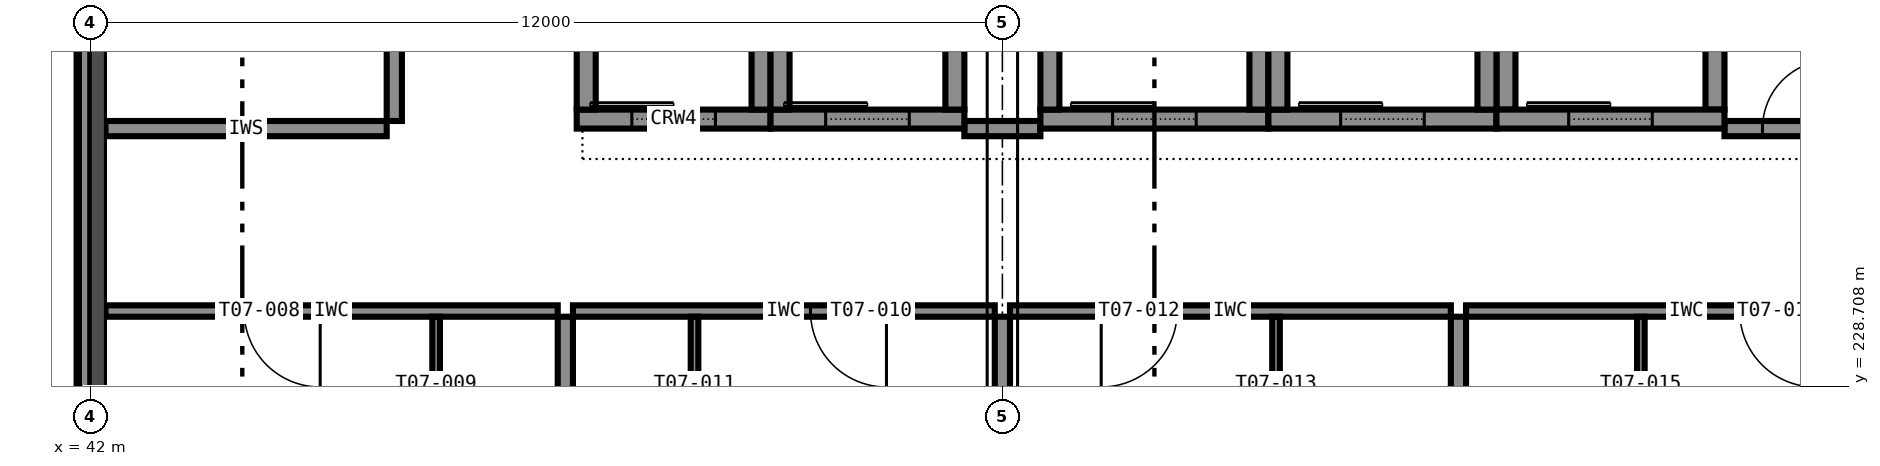
"""IFC4 building model, lengths in metres.
Left out: names, types, materials, properties, quantities, classifications, styles, units other than length and angle.
Written with IfcOpenShell. Run it as: python <this file> out.ifc"""

import sys

from ifc_helpers import new_model, si_unit, direction, frame, frame_2d, origin, place, context, subcontext, project, spatial, rectangle, extrude, element, fill, save


model = new_model("IFC4")
c1 = context("Model", 3, precision=1e-05, world=origin(), true_north=direction((0.0, 1.0)))
c2 = subcontext(c1, "Body", "Model", "MODEL_VIEW")
j1 = project(units=[si_unit("LENGTHUNIT", "METRE"), si_unit("PLANEANGLEUNIT", "RADIAN")], contexts=[c1])
p1 = place(None, origin())
s1 = spatial("IfcSite", under=j1, at=p1, CompositionType="ELEMENT")
p2 = place(p1, origin())
s2 = spatial("IfcBuilding", under=s1, at=p2, CompositionType="ELEMENT")
p3 = place(p2, frame((0.0, 0.0, 39.0)))
s3 = spatial("IfcBuildingStorey", under=s2, at=p3, CompositionType="ELEMENT", Elevation=39.0)
p4 = place(p3, frame((54.5, 232.225, 0.0), z_axis=(0.0, 0.0, 1.0), x_axis=(1.0, 0.0, 0.0)))
e1 = element("IfcWall", 1, at=p4, inside=s3, PredefinedType="SHEAR", context=c2, shape_type="SweptSolid", body=[
    extrude(rectangle(XDim=3.0, YDim=0.25, at=frame_2d((1.5, 0.0))), origin(), (0.0, 0.0, 1.0), 3.6),
])
p5 = place(p4, frame((0.95, 0.0, 0.0)))
e2 = element("IfcOpeningElement", 2, at=p5, cuts=e1, PredefinedType="OPENING", context=c2, shape_type="SweptSolid", body=[
    extrude(rectangle(XDim=1.1, YDim=2.1, at=frame_2d((0.55, 1.05))), frame((0.0, 0.135, 0.0), z_axis=(0.0, -1.0, 0.0), x_axis=(1.0, 0.0, 0.0)), (0.0, 0.0, 1.0), 0.27),
])
for number, where, z_axis, x_axis in (
    (3, (54.625, 232.35, 0.0), (0.0, 0.0, 1.0), (0.0, 1.0, 0.0)),
    (4, (57.375, 232.35, 0.0), (0.0, 0.0, 1.0), (0.0, 1.0, 0.0)),
):
    element("IfcWall", number, at=place(p3, frame(where, z_axis=z_axis, x_axis=x_axis)), inside=s3, PredefinedType="SHEAR", context=c2, shape_type="SweptSolid", body=[
        extrude(rectangle(XDim=3.3, YDim=0.25, at=frame_2d((1.65, 0.0))), origin(), (0.0, 0.0, 1.0), 3.6),
    ])
p6 = place(p3, frame((57.5, 232.225, 0.0), z_axis=(0.0, 0.0, 1.0), x_axis=(1.0, 0.0, 0.0)))
e5 = element("IfcWall", 5, at=p6, inside=s3, PredefinedType="SHEAR", context=c2, shape_type="SweptSolid", body=[
    extrude(rectangle(XDim=3.0, YDim=0.25, at=frame_2d((1.5, 0.0))), origin(), (0.0, 0.0, 1.0), 3.6),
])
p7 = place(p6, frame((0.95, 0.0, 0.0)))
e6 = element("IfcOpeningElement", 6, at=p7, cuts=e5, PredefinedType="OPENING", context=c2, shape_type="SweptSolid", body=[
    extrude(rectangle(XDim=1.1, YDim=2.1, at=frame_2d((0.55, 1.05))), frame((0.0, 0.135, 0.0), z_axis=(0.0, -1.0, 0.0), x_axis=(1.0, 0.0, 0.0)), (0.0, 0.0, 1.0), 0.27),
])
for number, where, z_axis, x_axis in (
    (7, (57.625, 232.35, 0.0), (0.0, 0.0, 1.0), (0.0, 1.0, 0.0)),
    (8, (60.375, 232.35, 0.0), (0.0, 0.0, 1.0), (0.0, 1.0, 0.0)),
):
    element("IfcWall", number, at=place(p3, frame(where, z_axis=z_axis, x_axis=x_axis)), inside=s3, PredefinedType="SHEAR", context=c2, shape_type="SweptSolid", body=[
        extrude(rectangle(XDim=3.3, YDim=0.25, at=frame_2d((1.65, 0.0))), origin(), (0.0, 0.0, 1.0), 3.6),
    ])
p8 = place(p3, frame((60.5, 232.225, 0.0), z_axis=(0.0, 0.0, 1.0), x_axis=(1.0, 0.0, 0.0)))
e9 = element("IfcWall", 9, at=p8, inside=s3, PredefinedType="SHEAR", context=c2, shape_type="SweptSolid", body=[
    extrude(rectangle(XDim=3.0, YDim=0.25, at=frame_2d((1.5, 0.0))), origin(), (0.0, 0.0, 1.0), 3.6),
])
p9 = place(p8, frame((0.95, 0.0, 0.0)))
e10 = element("IfcOpeningElement", 10, at=p9, cuts=e9, PredefinedType="OPENING", context=c2, shape_type="SweptSolid", body=[
    extrude(rectangle(XDim=1.1, YDim=2.1, at=frame_2d((0.55, 1.05))), frame((0.0, 0.135, 0.0), z_axis=(0.0, -1.0, 0.0), x_axis=(1.0, 0.0, 0.0)), (0.0, 0.0, 1.0), 0.27),
])
for number, where, z_axis, x_axis in (
    (11, (60.625, 232.35, 0.0), (0.0, 0.0, 1.0), (0.0, 1.0, 0.0)),
    (12, (63.375, 232.35, 0.0), (0.0, 0.0, 1.0), (0.0, 1.0, 0.0)),
):
    element("IfcWall", number, at=place(p3, frame(where, z_axis=z_axis, x_axis=x_axis)), inside=s3, PredefinedType="SHEAR", context=c2, shape_type="SweptSolid", body=[
        extrude(rectangle(XDim=3.3, YDim=0.25, at=frame_2d((1.65, 0.0))), origin(), (0.0, 0.0, 1.0), 3.6),
    ])
p10 = place(p3, frame((48.4, 232.225, 0.0), z_axis=(0.0, 0.0, 1.0), x_axis=(1.0, 0.0, 0.0)))
e13 = element("IfcWall", 13, at=p10, inside=s3, PredefinedType="SHEAR", context=c2, shape_type="SweptSolid", body=[
    extrude(rectangle(XDim=2.55, YDim=0.25, at=frame_2d((1.275, 0.0))), origin(), (0.0, 0.0, 1.0), 3.6),
])
p11 = place(p10, frame((0.725, 0.0, 0.0)))
e14 = element("IfcOpeningElement", 14, at=p11, cuts=e13, PredefinedType="OPENING", context=c2, shape_type="SweptSolid", body=[
    extrude(rectangle(XDim=1.1, YDim=2.1, at=frame_2d((0.55, 1.05))), frame((0.0, 0.135, 0.0), z_axis=(0.0, -1.0, 0.0), x_axis=(1.0, 0.0, 0.0)), (0.0, 0.0, 1.0), 0.27),
])
for number, where, z_axis, x_axis in (
    (15, (48.525, 232.35, 0.0), (0.0, 0.0, 1.0), (0.0, 1.0, 0.0)),
    (16, (50.825, 232.35, 0.0), (0.0, 0.0, 1.0), (0.0, 1.0, 0.0)),
):
    element("IfcWall", number, at=place(p3, frame(where, z_axis=z_axis, x_axis=x_axis)), inside=s3, PredefinedType="SHEAR", context=c2, shape_type="SweptSolid", body=[
        extrude(rectangle(XDim=3.3, YDim=0.25, at=frame_2d((1.65, 0.0))), origin(), (0.0, 0.0, 1.0), 3.6),
    ])
p12 = place(p3, frame((50.95, 232.225, 0.0), z_axis=(0.0, 0.0, 1.0), x_axis=(1.0, 0.0, 0.0)))
e17 = element("IfcWall", 17, at=p12, inside=s3, PredefinedType="SHEAR", context=c2, shape_type="SweptSolid", body=[
    extrude(rectangle(XDim=2.55, YDim=0.25, at=frame_2d((1.275, 0.0))), origin(), (0.0, 0.0, 1.0), 3.6),
])
p13 = place(p12, frame((0.725, 0.0, 0.0)))
e18 = element("IfcOpeningElement", 18, at=p13, cuts=e17, PredefinedType="OPENING", context=c2, shape_type="SweptSolid", body=[
    extrude(rectangle(XDim=1.1, YDim=2.1, at=frame_2d((0.55, 1.05))), frame((0.0, 0.135, 0.0), z_axis=(0.0, -1.0, 0.0), x_axis=(1.0, 0.0, 0.0)), (0.0, 0.0, 1.0), 0.27),
])
for number, where, z_axis, x_axis in (
    (19, (51.075, 232.35, 0.0), (0.0, 0.0, 1.0), (0.0, 1.0, 0.0)),
    (20, (53.375, 232.35, 0.0), (0.0, 0.0, 1.0), (0.0, 1.0, 0.0)),
):
    element("IfcWall", number, at=place(p3, frame(where, z_axis=z_axis, x_axis=x_axis)), inside=s3, PredefinedType="SHEAR", context=c2, shape_type="SweptSolid", body=[
        extrude(rectangle(XDim=3.3, YDim=0.25, at=frame_2d((1.65, 0.0))), origin(), (0.0, 0.0, 1.0), 3.6),
    ])
p14 = place(p3, frame((41.925, 233.6, 3.4), z_axis=(0.0, 0.0, 1.0), x_axis=(0.0, -1.0, 0.0)))
e21 = element("IfcWall", 21, at=p14, inside=s3, PredefinedType="STANDARD", context=c2, shape_type="SweptSolid", body=[
    extrude(rectangle(XDim=11.2, YDim=0.15, at=frame_2d((5.6, 0.0))), origin(), (0.0, 0.0, 1.0), 0.2),
])
p15 = place(p3, frame((42.2, 232.1, 0.0), z_axis=(0.0, 0.0, 1.0), x_axis=(1.0, 0.0, 0.0)))
e22 = element("IfcWall", 22, at=p15, inside=s3, PredefinedType="PARTITIONING", context=c2, shape_type="SweptSolid", body=[
    extrude(rectangle(XDim=3.7, YDim=0.2, at=frame_2d((1.85, 0.0))), origin(), (0.0, 0.0, 1.0), 3.4),
])
p16 = place(p3, frame((53.5, 232.1, 0.0), z_axis=(0.0, 0.0, 1.0), x_axis=(1.0, 0.0, 0.0)))
e23 = element("IfcWall", 23, at=p16, inside=s3, PredefinedType="PARTITIONING", context=c2, shape_type="SweptSolid", body=[
    extrude(rectangle(XDim=1.0, YDim=0.2, at=frame_2d((0.5, 0.0))), origin(), (0.0, 0.0, 1.0), 3.4),
])
p17 = place(p3, frame((63.5, 232.1, 0.0), z_axis=(0.0, 0.0, 1.0), x_axis=(1.0, 0.0, 0.0)))
e24 = element("IfcWall", 24, at=p17, inside=s3, PredefinedType="PARTITIONING", context=c2, shape_type="SweptSolid", body=[
    extrude(rectangle(XDim=1.9, YDim=0.2, at=frame_2d((0.95, 0.0))), origin(), (0.0, 0.0, 1.0), 3.4),
])
p18 = place(p17, frame((0.5, 0.0, 0.0)))
e25 = element("IfcOpeningElement", 25, at=p18, cuts=e24, PredefinedType="OPENING", context=c2, shape_type="SweptSolid", body=[
    extrude(rectangle(XDim=0.9, YDim=2.1, at=frame_2d((0.45, 1.05))), frame((0.0, 0.11, 0.0), z_axis=(0.0, -1.0, 0.0), x_axis=(1.0, 0.0, 0.0)), (0.0, 0.0, 1.0), 0.22),
])
p19 = place(p3, frame((46.0, 232.2, 0.0), z_axis=(0.0, 0.0, 1.0), x_axis=(0.0, 1.0, 0.0)))
e26 = element("IfcWall", 26, at=p19, inside=s3, PredefinedType="PARTITIONING", context=c2, shape_type="SweptSolid", body=[
    extrude(rectangle(XDim=3.6, YDim=0.2, at=frame_2d((1.8, 0.0))), origin(), (0.0, 0.0, 1.0), 3.4),
])
p20 = place(p19, frame((1.35, 0.0, 0.0)))
e27 = element("IfcOpeningElement", 27, at=p20, cuts=e26, PredefinedType="OPENING", context=c2, shape_type="SweptSolid", body=[
    extrude(rectangle(XDim=0.9, YDim=2.1, at=frame_2d((0.45, 1.05))), frame((0.0, 0.11, 0.0), z_axis=(0.0, -1.0, 0.0), x_axis=(1.0, 0.0, 0.0)), (0.0, 0.0, 1.0), 0.22),
])
p21 = place(p3, frame((48.15, 229.7, 0.0), z_axis=(0.0, 0.0, 1.0), x_axis=(-1.0, 0.0, 0.0)))
e28 = element("IfcWall", 28, at=p21, inside=s3, PredefinedType="PARTITIONING", context=c2, shape_type="SweptSolid", body=[
    extrude(rectangle(XDim=5.95, YDim=0.15, at=frame_2d((2.975, 0.0))), origin(), (0.0, 0.0, 1.0), 3.4),
])
p22 = place(p21, frame((3.125, 0.0, 0.0)))
e29 = element("IfcOpeningElement", 29, at=p22, cuts=e28, PredefinedType="OPENING", context=c2, shape_type="SweptSolid", body=[
    extrude(rectangle(XDim=1.0, YDim=2.1, at=frame_2d((0.5, 1.05))), frame((0.0, 0.085, 0.0), z_axis=(0.0, -1.0, 0.0), x_axis=(1.0, 0.0, 0.0)), (0.0, 0.0, 1.0), 0.17),
])
p23 = place(p3, frame((46.55, 226.75, 0.0), z_axis=(0.0, 0.0, 1.0), x_axis=(0.0, 1.0, 0.0)))
e30 = element("IfcWall", 30, at=p23, inside=s3, PredefinedType="PARTITIONING", context=c2, shape_type="SweptSolid", body=[
    extrude(rectangle(XDim=2.875, YDim=0.1, at=frame_2d((1.438, 0.0))), origin(), (0.0, 0.0, 1.0), 3.4),
])
p24 = place(p23, frame((1.038, 0.0, 0.0)))
e31 = element("IfcOpeningElement", 31, at=p24, cuts=e30, PredefinedType="OPENING", context=c2, shape_type="SweptSolid", body=[
    extrude(rectangle(XDim=0.8, YDim=2.1, at=frame_2d((0.4, 1.05))), frame((0.0, 0.06, 0.0), z_axis=(0.0, -1.0, 0.0), x_axis=(1.0, 0.0, 0.0)), (0.0, 0.0, 1.0), 0.12),
])
p25 = place(p3, frame((53.9, 229.7, 0.0), z_axis=(0.0, 0.0, 1.0), x_axis=(-1.0, 0.0, 0.0)))
e32 = element("IfcWall", 32, at=p25, inside=s3, PredefinedType="PARTITIONING", context=c2, shape_type="SweptSolid", body=[
    extrude(rectangle(XDim=5.55, YDim=0.15, at=frame_2d((2.775, 0.0))), origin(), (0.0, 0.0, 1.0), 3.4),
])
p26 = place(p25, frame((1.425, 0.0, 0.0)))
e33 = element("IfcOpeningElement", 33, at=p26, cuts=e32, PredefinedType="OPENING", context=c2, shape_type="SweptSolid", body=[
    extrude(rectangle(XDim=1.0, YDim=2.1, at=frame_2d((0.5, 1.05))), frame((0.0, 0.085, 0.0), z_axis=(0.0, -1.0, 0.0), x_axis=(1.0, 0.0, 0.0)), (0.0, 0.0, 1.0), 0.17),
])
p27 = place(p3, frame((49.95, 229.625, 0.0), z_axis=(0.0, 0.0, 1.0), x_axis=(0.0, -1.0, 0.0)))
e34 = element("IfcWall", 34, at=p27, inside=s3, PredefinedType="PARTITIONING", context=c2, shape_type="SweptSolid", body=[
    extrude(rectangle(XDim=2.875, YDim=0.1, at=frame_2d((1.438, 0.0))), origin(), (0.0, 0.0, 1.0), 3.4),
])
p28 = place(p27, frame((1.038, 0.0, 0.0)))
e35 = element("IfcOpeningElement", 35, at=p28, cuts=e34, PredefinedType="OPENING", context=c2, shape_type="SweptSolid", body=[
    extrude(rectangle(XDim=0.8, YDim=2.1, at=frame_2d((0.4, 1.05))), frame((0.0, 0.06, 0.0), z_axis=(0.0, -1.0, 0.0), x_axis=(1.0, 0.0, 0.0)), (0.0, 0.0, 1.0), 0.12),
])
p29 = place(p3, frame((59.9, 229.7, 0.0), z_axis=(0.0, 0.0, 1.0), x_axis=(-1.0, 0.0, 0.0)))
e36 = element("IfcWall", 36, at=p29, inside=s3, PredefinedType="PARTITIONING", context=c2, shape_type="SweptSolid", body=[
    extrude(rectangle(XDim=5.8, YDim=0.15, at=frame_2d((2.9, 0.0))), origin(), (0.0, 0.0, 1.0), 3.4),
])
p30 = place(p29, frame((3.6, 0.0, 0.0)))
e37 = element("IfcOpeningElement", 37, at=p30, cuts=e36, PredefinedType="OPENING", context=c2, shape_type="SweptSolid", body=[
    extrude(rectangle(XDim=1.0, YDim=2.1, at=frame_2d((0.5, 1.05))), frame((0.0, 0.085, 0.0), z_axis=(0.0, -1.0, 0.0), x_axis=(1.0, 0.0, 0.0)), (0.0, 0.0, 1.0), 0.17),
])
p31 = place(p3, frame((57.6, 226.75, 0.0), z_axis=(0.0, 0.0, 1.0), x_axis=(0.0, 1.0, 0.0)))
e38 = element("IfcWall", 38, at=p31, inside=s3, PredefinedType="PARTITIONING", context=c2, shape_type="SweptSolid", body=[
    extrude(rectangle(XDim=2.875, YDim=0.1, at=frame_2d((1.438, 0.0))), origin(), (0.0, 0.0, 1.0), 3.4),
])
p32 = place(p31, frame((1.038, 0.0, 0.0)))
e39 = element("IfcOpeningElement", 39, at=p32, cuts=e38, PredefinedType="OPENING", context=c2, shape_type="SweptSolid", body=[
    extrude(rectangle(XDim=0.8, YDim=2.1, at=frame_2d((0.4, 1.05))), frame((0.0, 0.06, 0.0), z_axis=(0.0, -1.0, 0.0), x_axis=(1.0, 0.0, 0.0)), (0.0, 0.0, 1.0), 0.12),
])
p33 = place(p3, frame((65.9, 229.7, 0.0), z_axis=(0.0, 0.0, 1.0), x_axis=(-1.0, 0.0, 0.0)))
e40 = element("IfcWall", 40, at=p33, inside=s3, PredefinedType="PARTITIONING", context=c2, shape_type="SweptSolid", body=[
    extrude(rectangle(XDim=5.8, YDim=0.15, at=frame_2d((2.9, 0.0))), origin(), (0.0, 0.0, 1.0), 3.4),
])
p34 = place(p33, frame((1.2, 0.0, 0.0)))
e41 = element("IfcOpeningElement", 41, at=p34, cuts=e40, PredefinedType="OPENING", context=c2, shape_type="SweptSolid", body=[
    extrude(rectangle(XDim=1.0, YDim=2.1, at=frame_2d((0.5, 1.05))), frame((0.0, 0.085, 0.0), z_axis=(0.0, -1.0, 0.0), x_axis=(1.0, 0.0, 0.0)), (0.0, 0.0, 1.0), 0.17),
])
p35 = place(p3, frame((62.4, 229.625, 0.0), z_axis=(0.0, 0.0, 1.0), x_axis=(0.0, -1.0, 0.0)))
e42 = element("IfcWall", 42, at=p35, inside=s3, PredefinedType="PARTITIONING", context=c2, shape_type="SweptSolid", body=[
    extrude(rectangle(XDim=2.875, YDim=0.1, at=frame_2d((1.438, 0.0))), origin(), (0.0, 0.0, 1.0), 3.4),
])
p36 = place(p35, frame((1.038, 0.0, 0.0)))
e43 = element("IfcOpeningElement", 43, at=p36, cuts=e42, PredefinedType="OPENING", context=c2, shape_type="SweptSolid", body=[
    extrude(rectangle(XDim=0.8, YDim=2.1, at=frame_2d((0.4, 1.05))), frame((0.0, 0.06, 0.0), z_axis=(0.0, -1.0, 0.0), x_axis=(1.0, 0.0, 0.0)), (0.0, 0.0, 1.0), 0.12),
])
p37 = place(p3, frame((48.25, 222.3, 0.0), z_axis=(0.0, 0.0, 1.0), x_axis=(0.0, 1.0, 0.0)))
e44 = element("IfcWall", 44, at=p37, inside=s3, PredefinedType="PARTITIONING", context=c2, shape_type="SweptSolid", body=[
    extrude(rectangle(XDim=7.325, YDim=0.2, at=frame_2d((3.663, 0.0))), origin(), (0.0, 0.0, 1.0), 3.4),
])
p38 = place(p3, frame((54.0, 222.4, 0.0), z_axis=(0.0, 0.0, 1.0), x_axis=(0.0, 1.0, 0.0)))
e45 = element("IfcWall", 45, at=p38, inside=s3, PredefinedType="PARTITIONING", context=c2, shape_type="SweptSolid", body=[
    extrude(rectangle(XDim=7.225, YDim=0.2, at=frame_2d((3.613, 0.0))), origin(), (0.0, 0.0, 1.0), 2.6),
])
p39 = place(p3, frame((60.0, 222.3, 0.0), z_axis=(0.0, 0.0, 1.0), x_axis=(0.0, 1.0, 0.0)))
e46 = element("IfcWall", 46, at=p39, inside=s3, PredefinedType="PARTITIONING", context=c2, shape_type="SweptSolid", body=[
    extrude(rectangle(XDim=7.325, YDim=0.2, at=frame_2d((3.663, 0.0))), origin(), (0.0, 0.0, 1.0), 3.4),
])
p40 = place(p18, origin())
e47 = element("IfcDoor", 47, at=p40, inside=s3, OperationType="SINGLE_SWING_RIGHT", PredefinedType="DOOR", context=c2, shape_type="SweptSolid", body=[
    extrude(rectangle(XDim=0.9, YDim=2.1, at=frame_2d((0.45, 1.05))), frame((0.0, 0.025, 0.0), z_axis=(0.0, -1.0, 0.0), x_axis=(1.0, 0.0, 0.0)), (0.0, 0.0, 1.0), 0.05),
])
fill(e25, e47)
p41 = place(p22, origin())
e48 = element("IfcDoor", 48, at=p41, inside=s3, OperationType="SINGLE_SWING_LEFT", PredefinedType="DOOR", context=c2, shape_type="SweptSolid", body=[
    extrude(rectangle(XDim=1.0, YDim=2.1, at=frame_2d((0.5, 1.05))), frame((0.0, 0.025, 0.0), z_axis=(0.0, -1.0, 0.0), x_axis=(1.0, 0.0, 0.0)), (0.0, 0.0, 1.0), 0.05),
])
fill(e29, e48)
p42 = place(p26, origin())
e49 = element("IfcDoor", 49, at=p42, inside=s3, OperationType="SINGLE_SWING_LEFT", PredefinedType="DOOR", context=c2, shape_type="SweptSolid", body=[
    extrude(rectangle(XDim=1.0, YDim=2.1, at=frame_2d((0.5, 1.05))), frame((0.0, 0.025, 0.0), z_axis=(0.0, -1.0, 0.0), x_axis=(1.0, 0.0, 0.0)), (0.0, 0.0, 1.0), 0.05),
])
fill(e33, e49)
p43 = place(p30, origin())
e50 = element("IfcDoor", 50, at=p43, inside=s3, OperationType="SINGLE_SWING_RIGHT", PredefinedType="DOOR", context=c2, shape_type="SweptSolid", body=[
    extrude(rectangle(XDim=1.0, YDim=2.1, at=frame_2d((0.5, 1.05))), frame((0.0, 0.025, 0.0), z_axis=(0.0, -1.0, 0.0), x_axis=(1.0, 0.0, 0.0)), (0.0, 0.0, 1.0), 0.05),
])
fill(e37, e50)
p44 = place(p34, origin())
e51 = element("IfcDoor", 51, at=p44, inside=s3, OperationType="SINGLE_SWING_LEFT", PredefinedType="DOOR", context=c2, shape_type="SweptSolid", body=[
    extrude(rectangle(XDim=1.0, YDim=2.1, at=frame_2d((0.5, 1.05))), frame((0.0, 0.025, 0.0), z_axis=(0.0, -1.0, 0.0), x_axis=(1.0, 0.0, 0.0)), (0.0, 0.0, 1.0), 0.05),
])
fill(e41, e51)
p45 = place(p5, origin())
e52 = element("IfcDoor", 52, at=p45, inside=s3, OperationType="SLIDING_TO_LEFT", PredefinedType="DOOR", context=c2, shape_type="SweptSolid", body=[
    extrude(rectangle(XDim=1.1, YDim=2.1, at=frame_2d((0.55, 1.05))), frame((0.0, 0.025, 0.0), z_axis=(0.0, -1.0, 0.0), x_axis=(1.0, 0.0, 0.0)), (0.0, 0.0, 1.0), 0.05),
])
fill(e2, e52)
p46 = place(p7, origin())
e53 = element("IfcDoor", 53, at=p46, inside=s3, OperationType="SLIDING_TO_LEFT", PredefinedType="DOOR", context=c2, shape_type="SweptSolid", body=[
    extrude(rectangle(XDim=1.1, YDim=2.1, at=frame_2d((0.55, 1.05))), frame((0.0, 0.025, 0.0), z_axis=(0.0, -1.0, 0.0), x_axis=(1.0, 0.0, 0.0)), (0.0, 0.0, 1.0), 0.05),
])
fill(e6, e53)
p47 = place(p9, origin())
e54 = element("IfcDoor", 54, at=p47, inside=s3, OperationType="SLIDING_TO_LEFT", PredefinedType="DOOR", context=c2, shape_type="SweptSolid", body=[
    extrude(rectangle(XDim=1.1, YDim=2.1, at=frame_2d((0.55, 1.05))), frame((0.0, 0.025, 0.0), z_axis=(0.0, -1.0, 0.0), x_axis=(1.0, 0.0, 0.0)), (0.0, 0.0, 1.0), 0.05),
])
fill(e10, e54)
p48 = place(p11, origin())
e55 = element("IfcDoor", 55, at=p48, inside=s3, OperationType="SLIDING_TO_LEFT", PredefinedType="DOOR", context=c2, shape_type="SweptSolid", body=[
    extrude(rectangle(XDim=1.1, YDim=2.1, at=frame_2d((0.55, 1.05))), frame((0.0, 0.025, 0.0), z_axis=(0.0, -1.0, 0.0), x_axis=(1.0, 0.0, 0.0)), (0.0, 0.0, 1.0), 0.05),
])
fill(e14, e55)
p49 = place(p13, origin())
e56 = element("IfcDoor", 56, at=p49, inside=s3, OperationType="SLIDING_TO_LEFT", PredefinedType="DOOR", context=c2, shape_type="SweptSolid", body=[
    extrude(rectangle(XDim=1.1, YDim=2.1, at=frame_2d((0.55, 1.05))), frame((0.0, 0.025, 0.0), z_axis=(0.0, -1.0, 0.0), x_axis=(1.0, 0.0, 0.0)), (0.0, 0.0, 1.0), 0.05),
])
fill(e18, e56)
save(model, sys.argv[1])
